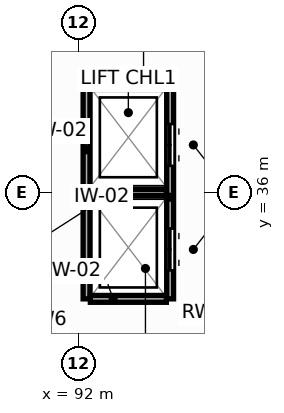
"""IFC4 building model, lengths in metres.
Left out: names, types, materials, properties, quantities, classifications, styles, units other than length and angle.
Written with IfcOpenShell. Run it as: python <this file> out.ifc"""

import sys

from ifc_helpers import new_model, si_unit, direction, frame, frame_2d, origin, place, context, subcontext, project, spatial, rectangle, extrude, element, fill, save


model = new_model("IFC4")
c1 = context("Model", 3, precision=1e-05, world=origin(), true_north=direction((0.0, 1.0)))
c2 = subcontext(c1, "Body", "Model", "MODEL_VIEW")
j1 = project(units=[si_unit("LENGTHUNIT", "METRE"), si_unit("PLANEANGLEUNIT", "RADIAN")], contexts=[c1])
p1 = place(None, origin())
s1 = spatial("IfcSite", under=j1, at=p1, CompositionType="ELEMENT")
p2 = place(p1, origin())
s2 = spatial("IfcBuilding", under=s1, at=p2, CompositionType="ELEMENT")
p3 = place(p2, frame((0.0, 0.0, 19.2)))
s3 = spatial("IfcBuildingStorey", under=s2, at=p3, CompositionType="ELEMENT", Elevation=19.2)
p4 = place(p3, frame((94.4, 33.2, 0.0), z_axis=(0.0, 0.0, 1.0), x_axis=(0.0, 1.0, 0.0)))
e1 = element("IfcWall", 1, at=p4, inside=s3, PredefinedType="PARTITIONING", context=c2, shape_type="SweptSolid", body=[
    extrude(rectangle(XDim=5.6, YDim=0.18, at=frame_2d((2.8, 0.0))), origin(), (0.0, 0.0, 1.0), 4.58),
])
p5 = place(p4, frame((3.5, 0.0, 0.0)))
e2 = element("IfcOpeningElement", 2, at=p5, cuts=e1, PredefinedType="OPENING", context=c2, shape_type="SweptSolid", body=[
    extrude(rectangle(XDim=1.1, YDim=2.1, at=frame_2d((0.55, 1.05))), frame((0.0, 0.1, 0.0), z_axis=(0.0, -1.0, 0.0), x_axis=(1.0, 0.0, 0.0)), (0.0, 0.0, 1.0), 0.2),
])
p6 = place(p4, frame((0.75, 0.0, 0.0)))
e3 = element("IfcOpeningElement", 3, at=p6, cuts=e1, PredefinedType="OPENING", context=c2, shape_type="SweptSolid", body=[
    extrude(rectangle(XDim=1.1, YDim=2.1, at=frame_2d((0.55, 1.05))), frame((0.0, 0.1, 0.0), z_axis=(0.0, -1.0, 0.0), x_axis=(1.0, 0.0, 0.0)), (0.0, 0.0, 1.0), 0.2),
])
p7 = place(p3, frame((92.2, 33.2, 0.0), z_axis=(0.0, 0.0, 1.0), x_axis=(0.0, 1.0, 0.0)))
e4 = element("IfcWall", 4, at=p7, inside=s3, PredefinedType="PARTITIONING", context=c2, shape_type="SweptSolid", body=[
    extrude(rectangle(XDim=5.6, YDim=0.18, at=frame_2d((2.8, 0.0))), origin(), (0.0, 0.0, 1.0), 4.58),
])
for number, where, z_axis, x_axis in (
    (5, (92.3, 38.8, 0.0), (0.0, 0.0, 1.0), (1.0, 0.0, 0.0)),
    (6, (92.3, 33.2, 0.0), (0.0, 0.0, 1.0), (1.0, 0.0, 0.0)),
):
    element("IfcWall", number, at=place(p3, frame(where, z_axis=z_axis, x_axis=x_axis)), inside=s3, PredefinedType="PARTITIONING", context=c2, shape_type="SweptSolid", body=[
        extrude(rectangle(XDim=2.0, YDim=0.18, at=frame_2d((1.0, 0.0))), origin(), (0.0, 0.0, 1.0), 4.58),
    ])
p8 = place(p3, frame((92.3, 36.0, 0.0), z_axis=(0.0, 0.0, 1.0), x_axis=(1.0, 0.0, 0.0)))
e7 = element("IfcWall", 7, at=p8, inside=s3, PredefinedType="PARTITIONING", context=c2, shape_type="SweptSolid", body=[
    extrude(rectangle(XDim=2.0, YDim=0.16, at=frame_2d((1.0, 0.0))), origin(), (0.0, 0.0, 1.0), 4.58),
])
p9 = place(p5, origin())
e8 = element("IfcDoor", 8, at=p9, inside=s3, OperationType="DOUBLE_DOOR_SLIDING", PredefinedType="DOOR", context=c2, shape_type="SweptSolid", body=[
    extrude(rectangle(XDim=1.1, YDim=2.1, at=frame_2d((0.55, 1.05))), frame((0.0, 0.025, 0.0), z_axis=(0.0, -1.0, 0.0), x_axis=(1.0, 0.0, 0.0)), (0.0, 0.0, 1.0), 0.05),
])
fill(e2, e8)
p10 = place(p6, origin())
e9 = element("IfcDoor", 9, at=p10, inside=s3, OperationType="DOUBLE_DOOR_SLIDING", PredefinedType="DOOR", context=c2, shape_type="SweptSolid", body=[
    extrude(rectangle(XDim=1.1, YDim=2.1, at=frame_2d((0.55, 1.05))), frame((0.0, 0.025, 0.0), z_axis=(0.0, -1.0, 0.0), x_axis=(1.0, 0.0, 0.0)), (0.0, 0.0, 1.0), 0.05),
])
fill(e3, e9)
save(model, sys.argv[1])
